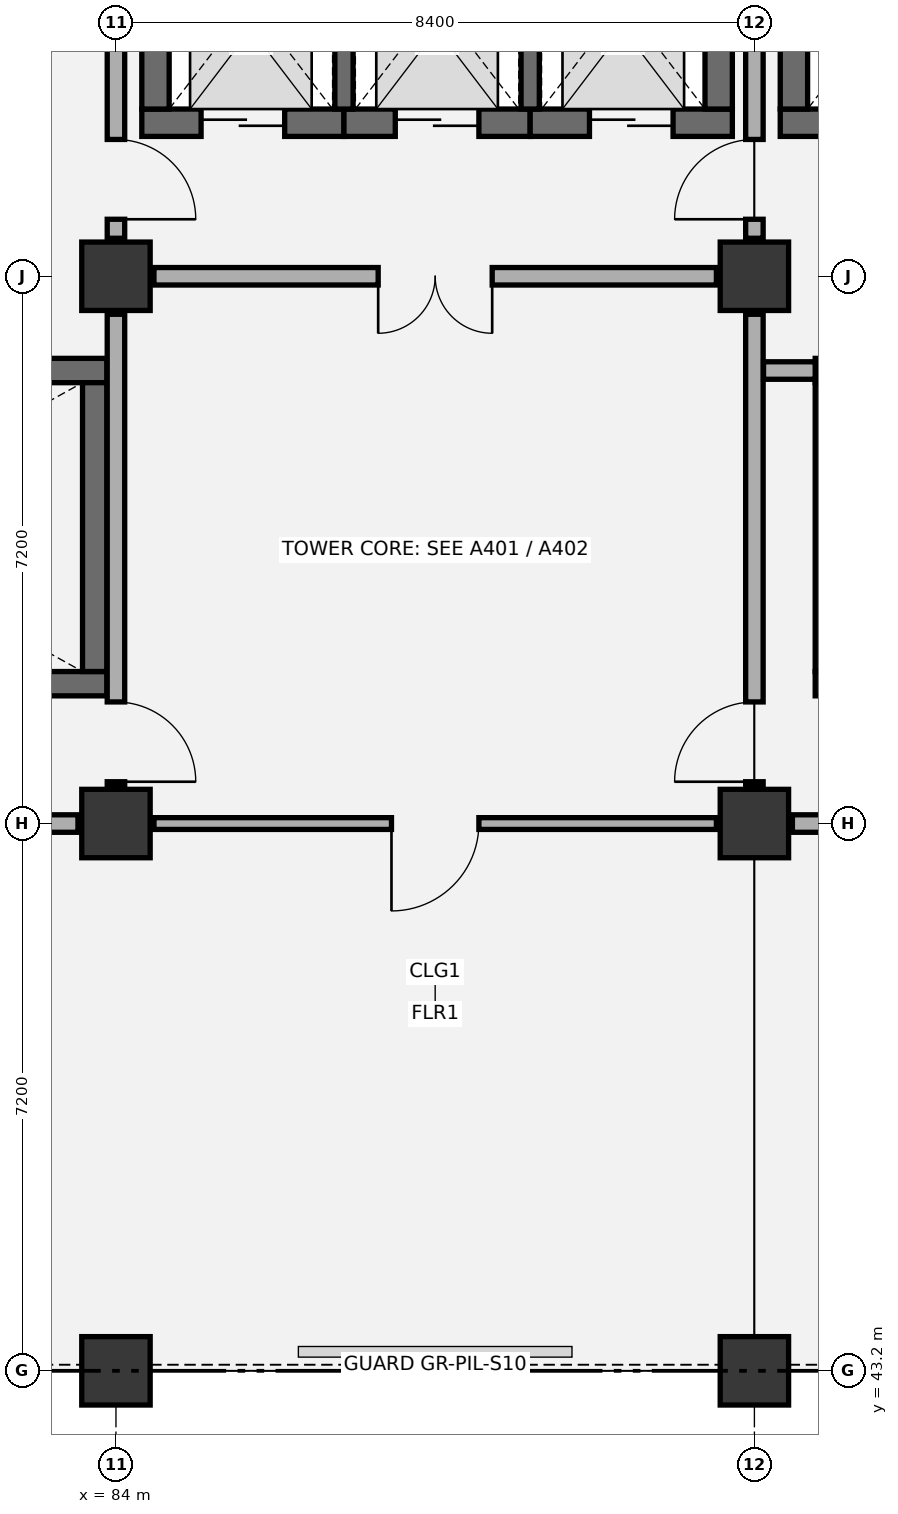
"""IFC4 building model, lengths in metres.
Left out: names, types, materials, properties, quantities, classifications, styles, units other than length and angle.
Written with IfcOpenShell. Run it as: python <this file> out.ifc"""

import sys

from ifc_helpers import new_model, si_unit, direction, frame, frame_2d, origin, origin_2d, place, context, subcontext, project, spatial, rectangle, circle, extrude, element, fill, save


model = new_model("IFC4")
c1 = context("Model", 3, precision=1e-05, world=origin(), true_north=direction((0.0, 1.0)))
c2 = subcontext(c1, "Body", "Model", "MODEL_VIEW")
j1 = project(units=[si_unit("LENGTHUNIT", "METRE"), si_unit("PLANEANGLEUNIT", "RADIAN")], contexts=[c1])
p1 = place(None, origin())
s1 = spatial("IfcSite", under=j1, at=p1, CompositionType="ELEMENT")
p2 = place(p1, origin())
s2 = spatial("IfcBuilding", under=s1, at=p2, CompositionType="ELEMENT")
p3 = place(p2, origin())
s3 = spatial("IfcBuildingStorey", under=s2, at=p3, CompositionType="ELEMENT", Elevation=0.0)
p4 = place(p3, frame((84.0, 43.2, 0.0), z_axis=(0.0, 0.0, 1.0), x_axis=(1.0, 0.0, 0.0)))
e1 = element("IfcColumn", 1, at=p4, inside=s3, PredefinedType="COLUMN", context=c2, shape_type="SweptSolid", body=[
    extrude(circle(Radius=0.45, at=origin_2d()), origin(), (0.0, 0.0, 1.0), 6.0),
])
for number, where, z_axis, x_axis in (
    (2, (84.0, 50.4, 0.0), (0.0, 0.0, 1.0), (1.0, 0.0, 0.0)),
    (3, (84.0, 57.6, 0.0), (0.0, 0.0, 1.0), (1.0, 0.0, 0.0)),
):
    element("IfcColumn", number, at=place(p3, frame(where, z_axis=z_axis, x_axis=x_axis)), inside=s3, PredefinedType="COLUMN", context=c2, shape_type="SweptSolid", body=[
        extrude(rectangle(XDim=0.9, YDim=0.9, at=origin_2d()), origin(), (0.0, 0.0, 1.0), 6.0),
    ])
p5 = place(p3, frame((92.4, 43.2, 0.0), z_axis=(0.0, 0.0, 1.0), x_axis=(1.0, 0.0, 0.0)))
e4 = element("IfcColumn", 4, at=p5, inside=s3, PredefinedType="COLUMN", context=c2, shape_type="SweptSolid", body=[
    extrude(circle(Radius=0.45, at=origin_2d()), origin(), (0.0, 0.0, 1.0), 6.0),
])
for number, where, z_axis, x_axis in (
    (5, (92.4, 50.4, 0.0), (0.0, 0.0, 1.0), (1.0, 0.0, 0.0)),
    (6, (92.4, 57.6, 0.0), (0.0, 0.0, 1.0), (1.0, 0.0, 0.0)),
):
    element("IfcColumn", number, at=place(p3, frame(where, z_axis=z_axis, x_axis=x_axis)), inside=s3, PredefinedType="COLUMN", context=c2, shape_type="SweptSolid", body=[
        extrude(rectangle(XDim=0.9, YDim=0.9, at=origin_2d()), origin(), (0.0, 0.0, 1.0), 6.0),
    ])
p6 = place(p3, frame((76.4, 52.24, 0.0), z_axis=(0.0, 0.0, 1.0), x_axis=(1.0, 0.0, 0.0)))
e7 = element("IfcWall", 7, at=p6, inside=s3, PredefinedType="SHEAR", context=c2, shape_type="SweptSolid", body=[
    extrude(rectangle(XDim=7.48, YDim=0.32, at=frame_2d((3.74, 0.0))), origin(), (0.0, 0.0, 1.0), 5.675),
])
p7 = place(p6, frame((0.45, 0.0, 0.0)))
e8 = element("IfcOpeningElement", 8, at=p7, cuts=e7, PredefinedType="OPENING", context=c2, shape_type="SweptSolid", body=[
    extrude(rectangle(XDim=1.05, YDim=2.15, at=frame_2d((0.525, 1.075))), frame((0.0, 0.17, 0.0), z_axis=(0.0, -1.0, 0.0), x_axis=(1.0, 0.0, 0.0)), (0.0, 0.0, 1.0), 0.34),
])
p8 = place(p3, frame((76.4, 56.36, 0.0), z_axis=(0.0, 0.0, 1.0), x_axis=(1.0, 0.0, 0.0)))
e9 = element("IfcWall", 9, at=p8, inside=s3, PredefinedType="SHEAR", context=c2, shape_type="SweptSolid", body=[
    extrude(rectangle(XDim=7.48, YDim=0.32, at=frame_2d((3.74, 0.0))), origin(), (0.0, 0.0, 1.0), 5.675),
])
p9 = place(p3, frame((83.72, 52.4, 0.0), z_axis=(0.0, 0.0, 1.0), x_axis=(0.0, 1.0, 0.0)))
e10 = element("IfcWall", 10, at=p9, inside=s3, PredefinedType="SHEAR", context=c2, shape_type="SweptSolid", body=[
    extrude(rectangle(XDim=3.8, YDim=0.32, at=frame_2d((1.9, 0.0))), origin(), (0.0, 0.0, 1.0), 5.675),
])
p10 = place(p3, frame((93.2, 52.24, 0.0), z_axis=(0.0, 0.0, 1.0), x_axis=(1.0, 0.0, 0.0)))
e11 = element("IfcWall", 11, at=p10, inside=s3, PredefinedType="SHEAR", context=c2, shape_type="SweptSolid", body=[
    extrude(rectangle(XDim=7.48, YDim=0.32, at=frame_2d((3.74, 0.0))), origin(), (0.0, 0.0, 1.0), 5.675),
])
p11 = place(p10, frame((0.45, 0.0, 0.0)))
e12 = element("IfcOpeningElement", 12, at=p11, cuts=e11, PredefinedType="OPENING", context=c2, shape_type="SweptSolid", body=[
    extrude(rectangle(XDim=1.05, YDim=2.15, at=frame_2d((0.525, 1.075))), frame((0.0, 0.17, 0.0), z_axis=(0.0, -1.0, 0.0), x_axis=(1.0, 0.0, 0.0)), (0.0, 0.0, 1.0), 0.34),
])
p12 = place(p3, frame((93.2, 56.36, 0.0), z_axis=(0.0, 0.0, 1.0), x_axis=(1.0, 0.0, 0.0)))
e13 = element("IfcWall", 13, at=p12, inside=s3, PredefinedType="SHEAR", context=c2, shape_type="SweptSolid", body=[
    extrude(rectangle(XDim=7.48, YDim=0.32, at=frame_2d((3.74, 0.0))), origin(), (0.0, 0.0, 1.0), 5.675),
])
p13 = place(p3, frame((93.36, 52.4, 0.0), z_axis=(0.0, 0.0, 1.0), x_axis=(0.0, 1.0, 0.0)))
e14 = element("IfcWall", 14, at=p13, inside=s3, PredefinedType="SHEAR", context=c2, shape_type="SweptSolid", body=[
    extrude(rectangle(XDim=3.8, YDim=0.32, at=frame_2d((1.9, 0.0))), origin(), (0.0, 0.0, 1.0), 5.675),
])
p14 = place(p3, frame((84.34, 59.62, 0.0), z_axis=(0.0, 0.0, 1.0), x_axis=(1.0, 0.0, 0.0)))
e15 = element("IfcWall", 15, at=p14, inside=s3, PredefinedType="SHEAR", context=c2, shape_type="SweptSolid", body=[
    extrude(rectangle(XDim=2.66, YDim=0.36, at=frame_2d((1.33, 0.0))), origin(), (0.0, 0.0, 1.0), 5.675),
])
p15 = place(p14, frame((0.78, 0.0, 0.0)))
e16 = element("IfcOpeningElement", 16, at=p15, cuts=e15, PredefinedType="OPENING", context=c2, shape_type="SweptSolid", body=[
    extrude(rectangle(XDim=1.1, YDim=2.15, at=frame_2d((0.55, 1.075))), frame((0.0, 0.19, 0.0), z_axis=(0.0, -1.0, 0.0), x_axis=(1.0, 0.0, 0.0)), (0.0, 0.0, 1.0), 0.38),
])
p16 = place(p3, frame((87.0, 59.62, 0.0), z_axis=(0.0, 0.0, 1.0), x_axis=(1.0, 0.0, 0.0)))
e17 = element("IfcWall", 17, at=p16, inside=s3, PredefinedType="SHEAR", context=c2, shape_type="SweptSolid", body=[
    extrude(rectangle(XDim=2.45, YDim=0.36, at=frame_2d((1.225, 0.0))), origin(), (0.0, 0.0, 1.0), 5.675),
])
p17 = place(p16, frame((0.675, 0.0, 0.0)))
e18 = element("IfcOpeningElement", 18, at=p17, cuts=e17, PredefinedType="OPENING", context=c2, shape_type="SweptSolid", body=[
    extrude(rectangle(XDim=1.1, YDim=2.15, at=frame_2d((0.55, 1.075))), frame((0.0, 0.19, 0.0), z_axis=(0.0, -1.0, 0.0), x_axis=(1.0, 0.0, 0.0)), (0.0, 0.0, 1.0), 0.38),
])
p18 = place(p3, frame((89.45, 59.62, 0.0), z_axis=(0.0, 0.0, 1.0), x_axis=(1.0, 0.0, 0.0)))
e19 = element("IfcWall", 19, at=p18, inside=s3, PredefinedType="SHEAR", context=c2, shape_type="SweptSolid", body=[
    extrude(rectangle(XDim=2.66, YDim=0.36, at=frame_2d((1.33, 0.0))), origin(), (0.0, 0.0, 1.0), 5.675),
])
p19 = place(p18, frame((0.78, 0.0, 0.0)))
e20 = element("IfcOpeningElement", 20, at=p19, cuts=e19, PredefinedType="OPENING", context=c2, shape_type="SweptSolid", body=[
    extrude(rectangle(XDim=1.1, YDim=2.15, at=frame_2d((0.55, 1.075))), frame((0.0, 0.19, 0.0), z_axis=(0.0, -1.0, 0.0), x_axis=(1.0, 0.0, 0.0)), (0.0, 0.0, 1.0), 0.38),
])
for number, where, z_axis, x_axis in (
    (21, (84.52, 59.8, 0.0), (0.0, 0.0, 1.0), (0.0, 1.0, 0.0)),
    (22, (91.93, 59.8, 0.0), (0.0, 0.0, 1.0), (0.0, 1.0, 0.0)),
):
    element("IfcWall", number, at=place(p3, frame(where, z_axis=z_axis, x_axis=x_axis)), inside=s3, PredefinedType="SHEAR", context=c2, shape_type="SweptSolid", body=[
        extrude(rectangle(XDim=2.8, YDim=0.36, at=frame_2d((1.4, 0.0))), origin(), (0.0, 0.0, 1.0), 5.675),
    ])
for number, where, z_axis, x_axis in (
    (23, (87.0, 59.8, 0.0), (0.0, 0.0, 1.0), (0.0, 1.0, 0.0)),
    (24, (89.45, 59.8, 0.0), (0.0, 0.0, 1.0), (0.0, 1.0, 0.0)),
):
    element("IfcWall", number, at=place(p3, frame(where, z_axis=z_axis, x_axis=x_axis)), inside=s3, PredefinedType="SHEAR", context=c2, shape_type="SweptSolid", body=[
        extrude(rectangle(XDim=2.8, YDim=0.24, at=frame_2d((1.4, 0.0))), origin(), (0.0, 0.0, 1.0), 5.675),
    ])
p20 = place(p3, frame((92.74, 59.62, 0.0), z_axis=(0.0, 0.0, 1.0), x_axis=(1.0, 0.0, 0.0)))
e25 = element("IfcWall", 25, at=p20, inside=s3, PredefinedType="SHEAR", context=c2, shape_type="SweptSolid", body=[
    extrude(rectangle(XDim=2.87, YDim=0.36, at=frame_2d((1.435, 0.0))), origin(), (0.0, 0.0, 1.0), 5.675),
])
p21 = place(p20, frame((0.76, 0.0, 0.0)))
e26 = element("IfcOpeningElement", 26, at=p21, cuts=e25, PredefinedType="OPENING", context=c2, shape_type="SweptSolid", body=[
    extrude(rectangle(XDim=1.35, YDim=2.2, at=frame_2d((0.675, 1.1))), frame((0.0, 0.19, 0.0), z_axis=(0.0, -1.0, 0.0), x_axis=(1.0, 0.0, 0.0)), (0.0, 0.0, 1.0), 0.38),
])
p22 = place(p3, frame((92.92, 59.8, 0.0), z_axis=(0.0, 0.0, 1.0), x_axis=(0.0, 1.0, 0.0)))
e27 = element("IfcWall", 27, at=p22, inside=s3, PredefinedType="SHEAR", context=c2, shape_type="SweptSolid", body=[
    extrude(rectangle(XDim=2.8, YDim=0.36, at=frame_2d((1.4, 0.0))), origin(), (0.0, 0.0, 1.0), 5.675),
])
p23 = place(p3, frame((76.1, 50.4, 0.0), z_axis=(0.0, 0.0, 1.0), x_axis=(1.0, 0.0, 0.0)))
e28 = element("IfcWall", 28, at=p23, inside=s3, PredefinedType="PARTITIONING", context=c2, shape_type="SweptSolid", body=[
    extrude(rectangle(XDim=7.4, YDim=0.23, at=frame_2d((3.7, 0.0))), origin(), (0.0, 0.0, 1.0), 4.87),
])
p24 = place(p23, frame((2.95, 0.0, 0.0)))
e29 = element("IfcOpeningElement", 29, at=p24, cuts=e28, PredefinedType="OPENING", context=c2, shape_type="SweptSolid", body=[
    extrude(rectangle(XDim=1.5, YDim=2.15, at=frame_2d((0.75, 1.075))), frame((0.0, 0.125, 0.0), z_axis=(0.0, -1.0, 0.0), x_axis=(1.0, 0.0, 0.0)), (0.0, 0.0, 1.0), 0.25),
])
p25 = place(p3, frame((84.0, 50.9, 0.0), z_axis=(0.0, 0.0, 1.0), x_axis=(0.0, 1.0, 0.0)))
e30 = element("IfcWall", 30, at=p25, inside=s3, PredefinedType="PARTITIONING", context=c2, shape_type="SweptSolid", body=[
    extrude(rectangle(XDim=6.2, YDim=0.23, at=frame_2d((3.1, 0.0))), origin(), (0.0, 0.0, 1.0), 4.92),
])
p26 = place(p25, frame((0.05, 0.0, 0.0)))
e31 = element("IfcOpeningElement", 31, at=p26, cuts=e30, PredefinedType="OPENING", context=c2, shape_type="SweptSolid", body=[
    extrude(rectangle(XDim=1.05, YDim=2.15, at=frame_2d((0.525, 1.075))), frame((0.0, 0.125, 0.0), z_axis=(0.0, -1.0, 0.0), x_axis=(1.0, 0.0, 0.0)), (0.0, 0.0, 1.0), 0.25),
])
p27 = place(p3, frame((84.0, 58.1, 0.0), z_axis=(0.0, 0.0, 1.0), x_axis=(0.0, 1.0, 0.0)))
e32 = element("IfcWall", 32, at=p27, inside=s3, PredefinedType="PARTITIONING", context=c2, shape_type="SweptSolid", body=[
    extrude(rectangle(XDim=6.2, YDim=0.23, at=frame_2d((3.1, 0.0))), origin(), (0.0, 0.0, 1.0), 5.27),
])
p28 = place(p27, frame((0.25, 0.0, 0.0)))
e33 = element("IfcOpeningElement", 33, at=p28, cuts=e32, PredefinedType="OPENING", context=c2, shape_type="SweptSolid", body=[
    extrude(rectangle(XDim=1.05, YDim=2.15, at=frame_2d((0.525, 1.075))), frame((0.0, 0.125, 0.0), z_axis=(0.0, -1.0, 0.0), x_axis=(1.0, 0.0, 0.0)), (0.0, 0.0, 1.0), 0.25),
])
p29 = place(p3, frame((84.5, 50.4, 0.0), z_axis=(0.0, 0.0, 1.0), x_axis=(1.0, 0.0, 0.0)))
e34 = element("IfcWall", 34, at=p29, inside=s3, PredefinedType="PARTITIONING", context=c2, shape_type="SweptSolid", body=[
    extrude(rectangle(XDim=7.4, YDim=0.155, at=frame_2d((3.7, 0.0))), origin(), (0.0, 0.0, 1.0), 4.87),
])
p30 = place(p29, frame((3.125, 0.0, 0.0)))
e35 = element("IfcOpeningElement", 35, at=p30, cuts=e34, PredefinedType="OPENING", context=c2, shape_type="SweptSolid", body=[
    extrude(rectangle(XDim=1.15, YDim=2.1, at=frame_2d((0.575, 1.05))), frame((0.0, 0.087, 0.0), z_axis=(0.0, -1.0, 0.0), x_axis=(1.0, 0.0, 0.0)), (0.0, 0.0, 1.0), 0.175),
])
p31 = place(p3, frame((92.4, 50.9, 0.0), z_axis=(0.0, 0.0, 1.0), x_axis=(0.0, 1.0, 0.0)))
e36 = element("IfcWall", 36, at=p31, inside=s3, PredefinedType="PARTITIONING", context=c2, shape_type="SweptSolid", body=[
    extrude(rectangle(XDim=6.2, YDim=0.23, at=frame_2d((3.1, 0.0))), origin(), (0.0, 0.0, 1.0), 5.27),
])
p32 = place(p31, frame((0.05, 0.0, 0.0)))
e37 = element("IfcOpeningElement", 37, at=p32, cuts=e36, PredefinedType="OPENING", context=c2, shape_type="SweptSolid", body=[
    extrude(rectangle(XDim=1.05, YDim=2.15, at=frame_2d((0.525, 1.075))), frame((0.0, 0.125, 0.0), z_axis=(0.0, -1.0, 0.0), x_axis=(1.0, 0.0, 0.0)), (0.0, 0.0, 1.0), 0.25),
])
p33 = place(p3, frame((84.5, 57.6, 0.0), z_axis=(0.0, 0.0, 1.0), x_axis=(1.0, 0.0, 0.0)))
e38 = element("IfcWall", 38, at=p33, inside=s3, PredefinedType="PARTITIONING", context=c2, shape_type="SweptSolid", body=[
    extrude(rectangle(XDim=7.4, YDim=0.23, at=frame_2d((3.7, 0.0))), origin(), (0.0, 0.0, 1.0), 4.87),
])
p34 = place(p33, frame((2.95, 0.0, 0.0)))
e39 = element("IfcOpeningElement", 39, at=p34, cuts=e38, PredefinedType="OPENING", context=c2, shape_type="SweptSolid", body=[
    extrude(rectangle(XDim=1.5, YDim=2.15, at=frame_2d((0.75, 1.075))), frame((0.0, 0.125, 0.0), z_axis=(0.0, -1.0, 0.0), x_axis=(1.0, 0.0, 0.0)), (0.0, 0.0, 1.0), 0.25),
])
p35 = place(p3, frame((92.4, 58.1, 0.0), z_axis=(0.0, 0.0, 1.0), x_axis=(0.0, 1.0, 0.0)))
e40 = element("IfcWall", 40, at=p35, inside=s3, PredefinedType="PARTITIONING", context=c2, shape_type="SweptSolid", body=[
    extrude(rectangle(XDim=6.2, YDim=0.23, at=frame_2d((3.1, 0.0))), origin(), (0.0, 0.0, 1.0), 4.92),
])
p36 = place(p35, frame((0.25, 0.0, 0.0)))
e41 = element("IfcOpeningElement", 41, at=p36, cuts=e40, PredefinedType="OPENING", context=c2, shape_type="SweptSolid", body=[
    extrude(rectangle(XDim=1.05, YDim=2.15, at=frame_2d((0.525, 1.075))), frame((0.0, 0.125, 0.0), z_axis=(0.0, -1.0, 0.0), x_axis=(1.0, 0.0, 0.0)), (0.0, 0.0, 1.0), 0.25),
])
p37 = place(p3, frame((92.9, 50.4, 0.0), z_axis=(0.0, 0.0, 1.0), x_axis=(1.0, 0.0, 0.0)))
e42 = element("IfcWall", 42, at=p37, inside=s3, PredefinedType="PARTITIONING", context=c2, shape_type="SweptSolid", body=[
    extrude(rectangle(XDim=7.4, YDim=0.23, at=frame_2d((3.7, 0.0))), origin(), (0.0, 0.0, 1.0), 4.87),
])
p38 = place(p37, frame((2.95, 0.0, 0.0)))
e43 = element("IfcOpeningElement", 43, at=p38, cuts=e42, PredefinedType="OPENING", context=c2, shape_type="SweptSolid", body=[
    extrude(rectangle(XDim=1.5, YDim=2.15, at=frame_2d((0.75, 1.075))), frame((0.0, 0.125, 0.0), z_axis=(0.0, -1.0, 0.0), x_axis=(1.0, 0.0, 0.0)), (0.0, 0.0, 1.0), 0.25),
])
p39 = place(p3, frame((92.52, 56.36, 0.0), z_axis=(0.0, 0.0, 1.0), x_axis=(1.0, 0.0, 0.0)))
e44 = element("IfcWall", 44, at=p39, inside=s3, PredefinedType="PARTITIONING", context=c2, shape_type="SweptSolid", body=[
    extrude(rectangle(XDim=0.68, YDim=0.23, at=frame_2d((0.34, 0.0))), origin(), (0.0, 0.0, 1.0), 5.675),
])
p40 = place(p15, origin())
e45 = element("IfcDoor", 45, at=p40, inside=s3, OperationType="DOUBLE_DOOR_SLIDING", PredefinedType="DOOR", context=c2, shape_type="SweptSolid", body=[
    extrude(rectangle(XDim=1.1, YDim=2.15, at=frame_2d((0.55, 1.075))), frame((0.0, 0.025, 0.0), z_axis=(0.0, -1.0, 0.0), x_axis=(1.0, 0.0, 0.0)), (0.0, 0.0, 1.0), 0.05),
])
fill(e16, e45)
p41 = place(p17, origin())
e46 = element("IfcDoor", 46, at=p41, inside=s3, OperationType="DOUBLE_DOOR_SLIDING", PredefinedType="DOOR", context=c2, shape_type="SweptSolid", body=[
    extrude(rectangle(XDim=1.1, YDim=2.15, at=frame_2d((0.55, 1.075))), frame((0.0, 0.025, 0.0), z_axis=(0.0, -1.0, 0.0), x_axis=(1.0, 0.0, 0.0)), (0.0, 0.0, 1.0), 0.05),
])
fill(e18, e46)
p42 = place(p19, origin())
e47 = element("IfcDoor", 47, at=p42, inside=s3, OperationType="DOUBLE_DOOR_SLIDING", PredefinedType="DOOR", context=c2, shape_type="SweptSolid", body=[
    extrude(rectangle(XDim=1.1, YDim=2.15, at=frame_2d((0.55, 1.075))), frame((0.0, 0.025, 0.0), z_axis=(0.0, -1.0, 0.0), x_axis=(1.0, 0.0, 0.0)), (0.0, 0.0, 1.0), 0.05),
])
fill(e20, e47)
p43 = place(p26, frame((1.05, 0.0, 0.0), z_axis=(0.0, 0.0, 1.0), x_axis=(-1.0, 0.0, 0.0)))
e48 = element("IfcDoor", 48, at=p43, inside=s3, OperationType="SINGLE_SWING_RIGHT", PredefinedType="DOOR", context=c2, shape_type="SweptSolid", body=[
    extrude(rectangle(XDim=1.05, YDim=2.15, at=frame_2d((0.525, 1.075))), frame((0.0, 0.025, 0.0), z_axis=(0.0, -1.0, 0.0), x_axis=(1.0, 0.0, 0.0)), (0.0, 0.0, 1.0), 0.05),
])
fill(e31, e48)
p44 = place(p28, frame((1.05, 0.0, 0.0), z_axis=(0.0, 0.0, 1.0), x_axis=(-1.0, 0.0, 0.0)))
e49 = element("IfcDoor", 49, at=p44, inside=s3, OperationType="SINGLE_SWING_RIGHT", PredefinedType="DOOR", context=c2, shape_type="SweptSolid", body=[
    extrude(rectangle(XDim=1.05, YDim=2.15, at=frame_2d((0.525, 1.075))), frame((0.0, 0.025, 0.0), z_axis=(0.0, -1.0, 0.0), x_axis=(1.0, 0.0, 0.0)), (0.0, 0.0, 1.0), 0.05),
])
fill(e33, e49)
p45 = place(p30, frame((1.15, 0.0, 0.0), z_axis=(0.0, 0.0, 1.0), x_axis=(-1.0, 0.0, 0.0)))
e50 = element("IfcDoor", 50, at=p45, inside=s3, OperationType="SINGLE_SWING_RIGHT", PredefinedType="DOOR", context=c2, shape_type="SweptSolid", body=[
    extrude(rectangle(XDim=1.15, YDim=2.1, at=frame_2d((0.575, 1.05))), frame((0.0, 0.025, 0.0), z_axis=(0.0, -1.0, 0.0), x_axis=(1.0, 0.0, 0.0)), (0.0, 0.0, 1.0), 0.05),
])
fill(e35, e50)
p46 = place(p32, origin())
e51 = element("IfcDoor", 51, at=p46, inside=s3, OperationType="SINGLE_SWING_LEFT", PredefinedType="DOOR", context=c2, shape_type="SweptSolid", body=[
    extrude(rectangle(XDim=1.05, YDim=2.15, at=frame_2d((0.525, 1.075))), frame((0.0, 0.025, 0.0), z_axis=(0.0, -1.0, 0.0), x_axis=(1.0, 0.0, 0.0)), (0.0, 0.0, 1.0), 0.05),
])
fill(e37, e51)
p47 = place(p34, frame((1.5, 0.0, 0.0), z_axis=(0.0, 0.0, 1.0), x_axis=(-1.0, 0.0, 0.0)))
e52 = element("IfcDoor", 52, at=p47, inside=s3, OperationType="DOUBLE_DOOR_SINGLE_SWING", PredefinedType="DOOR", context=c2, shape_type="SweptSolid", body=[
    extrude(rectangle(XDim=1.5, YDim=2.15, at=frame_2d((0.75, 1.075))), frame((0.0, 0.025, 0.0), z_axis=(0.0, -1.0, 0.0), x_axis=(1.0, 0.0, 0.0)), (0.0, 0.0, 1.0), 0.05),
])
fill(e39, e52)
p48 = place(p36, origin())
e53 = element("IfcDoor", 53, at=p48, inside=s3, OperationType="SINGLE_SWING_LEFT", PredefinedType="DOOR", context=c2, shape_type="SweptSolid", body=[
    extrude(rectangle(XDim=1.05, YDim=2.15, at=frame_2d((0.525, 1.075))), frame((0.0, 0.025, 0.0), z_axis=(0.0, -1.0, 0.0), x_axis=(1.0, 0.0, 0.0)), (0.0, 0.0, 1.0), 0.05),
])
fill(e41, e53)
save(model, sys.argv[1])
